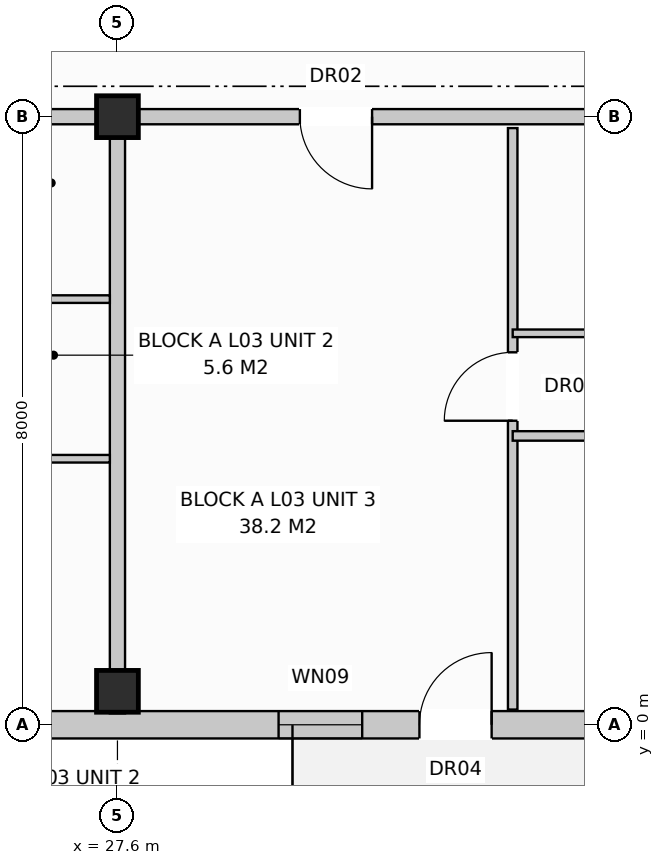
"""IFC4 building model, lengths in metres.
Left out: names, types, materials, properties, quantities, classifications, styles, units other than length and angle.
Written with IfcOpenShell. Run it as: python <this file> out.ifc"""

import sys

from ifc_helpers import new_model, si_unit, direction, frame, frame_2d, origin, origin_with_axes, origin_2d, place, context, subcontext, project, spatial, rectangle, extrude, element, fill, save


model = new_model("IFC4")
c1 = context("Model", 3, precision=1e-05, world=origin(), true_north=direction((0.0, 1.0)))
c2 = subcontext(c1, "Body", "Model", "MODEL_VIEW")
j1 = project(units=[si_unit("LENGTHUNIT", "METRE"), si_unit("PLANEANGLEUNIT", "RADIAN")], contexts=[c1])
p1 = place(None, origin())
s1 = spatial("IfcSite", under=j1, at=p1, CompositionType="ELEMENT")
p2 = place(p1, origin())
s2 = spatial("IfcBuilding", under=s1, at=p2, CompositionType="ELEMENT")
p3 = place(p2, frame((0.0, 0.0, 11.2)))
s3 = spatial("IfcBuildingStorey", under=s2, at=p3, CompositionType="ELEMENT", Elevation=11.2)
for number, where, z_axis, x_axis in (
    (1, (27.6, 0.44, 0.0), (0.0, 0.0, 1.0), (1.0, 0.0, 0.0)),
    (2, (27.6, 8.0, 0.0), (0.0, 0.0, 1.0), (1.0, 0.0, 0.0)),
):
    element("IfcColumn", number, at=place(p3, frame(where, z_axis=z_axis, x_axis=x_axis)), inside=s3, PredefinedType="COLUMN", context=c2, shape_type="SweptSolid", body=[
        extrude(rectangle(XDim=0.55, YDim=0.55, at=origin_2d()), origin(), (0.0, 0.0, 1.0), 3.2),
    ])
p4 = place(p3, frame((0.17, 0.0, 0.0), z_axis=(0.0, 0.0, 1.0), x_axis=(1.0, 0.0, 0.0)))
e3 = element("IfcWall", 3, at=p4, inside=s3, PredefinedType="STANDARD", context=c2, shape_type="SweptSolid", body=[
    extrude(rectangle(XDim=54.86, YDim=0.36, at=frame_2d((27.43, 0.0))), origin(), (0.0, 0.0, 1.0), 2.94),
])
p5 = place(p4, frame((4.903, 0.0, 0.0)))
e4 = element("IfcOpeningElement", 4, at=p5, cuts=e3, PredefinedType="OPENING", context=c2, shape_type="SweptSolid", body=[
    extrude(rectangle(XDim=0.95, YDim=2.1, at=frame_2d((0.475, 1.05))), frame((0.0, 0.192, 0.0), z_axis=(0.0, -1.0, 0.0), x_axis=(1.0, 0.0, 0.0)), (0.0, 0.0, 1.0), 0.384),
])
p6 = place(p4, frame((18.9, 0.0, 0.0)))
e5 = element("IfcOpeningElement", 5, at=p6, cuts=e3, PredefinedType="OPENING", context=c2, shape_type="SweptSolid", body=[
    extrude(rectangle(XDim=0.95, YDim=2.1, at=frame_2d((0.475, 1.05))), frame((0.0, 0.192, 0.0), z_axis=(0.0, -1.0, 0.0), x_axis=(1.0, 0.0, 0.0)), (0.0, 0.0, 1.0), 0.384),
])
p7 = place(p4, frame((31.403, 0.0, 0.0)))
e6 = element("IfcOpeningElement", 6, at=p7, cuts=e3, PredefinedType="OPENING", context=c2, shape_type="SweptSolid", body=[
    extrude(rectangle(XDim=0.95, YDim=2.1, at=frame_2d((0.475, 1.05))), frame((0.0, 0.192, 0.0), z_axis=(0.0, -1.0, 0.0), x_axis=(1.0, 0.0, 0.0)), (0.0, 0.0, 1.0), 0.384),
])
p8 = place(p4, frame((44.308, 0.0, 0.0)))
e7 = element("IfcOpeningElement", 7, at=p8, cuts=e3, PredefinedType="OPENING", context=c2, shape_type="SweptSolid", body=[
    extrude(rectangle(XDim=0.95, YDim=2.1, at=frame_2d((0.475, 1.05))), frame((0.0, 0.192, 0.0), z_axis=(0.0, -1.0, 0.0), x_axis=(1.0, 0.0, 0.0)), (0.0, 0.0, 1.0), 0.384),
])
p9 = place(p4, frame((2.1, 0.0, 0.8)))
e8 = element("IfcOpeningElement", 8, at=p9, cuts=e3, PredefinedType="OPENING", context=c2, shape_type="SweptSolid", body=[
    extrude(rectangle(XDim=1.8, YDim=1.7, at=frame_2d((0.9, 0.85))), frame((0.0, 0.192, 0.0), z_axis=(0.0, -1.0, 0.0), x_axis=(1.0, 0.0, 0.0)), (0.0, 0.0, 1.0), 0.384),
])
p10 = place(p4, frame((7.75, 0.0, 0.72)))
e9 = element("IfcOpeningElement", 9, at=p10, cuts=e3, PredefinedType="OPENING", context=c2, shape_type="SweptSolid", body=[
    extrude(rectangle(XDim=1.9, YDim=1.85, at=frame_2d((0.95, 0.925))), frame((0.0, 0.192, 0.0), z_axis=(0.0, -1.0, 0.0), x_axis=(1.0, 0.0, 0.0)), (0.0, 0.0, 1.0), 0.384),
])
p11 = place(p4, frame((14.55, 0.0, 0.72)))
e10 = element("IfcOpeningElement", 10, at=p11, cuts=e3, PredefinedType="OPENING", context=c2, shape_type="SweptSolid", body=[
    extrude(rectangle(XDim=1.1, YDim=1.5, at=frame_2d((0.55, 0.75))), frame((0.0, 0.192, 0.0), z_axis=(0.0, -1.0, 0.0), x_axis=(1.0, 0.0, 0.0)), (0.0, 0.0, 1.0), 0.384),
])
p12 = place(p4, frame((16.8, 0.0, 0.8)))
e11 = element("IfcOpeningElement", 11, at=p12, cuts=e3, PredefinedType="OPENING", context=c2, shape_type="SweptSolid", body=[
    extrude(rectangle(XDim=1.8, YDim=1.7, at=frame_2d((0.9, 0.85))), frame((0.0, 0.192, 0.0), z_axis=(0.0, -1.0, 0.0), x_axis=(1.0, 0.0, 0.0)), (0.0, 0.0, 1.0), 0.384),
])
p13 = place(p4, frame((21.55, 0.0, 0.72)))
e12 = element("IfcOpeningElement", 12, at=p13, cuts=e3, PredefinedType="OPENING", context=c2, shape_type="SweptSolid", body=[
    extrude(rectangle(XDim=1.9, YDim=1.85, at=frame_2d((0.95, 0.925))), frame((0.0, 0.192, 0.0), z_axis=(0.0, -1.0, 0.0), x_axis=(1.0, 0.0, 0.0)), (0.0, 0.0, 1.0), 0.384),
])
p14 = place(p4, frame((25.35, 0.0, 0.72)))
e13 = element("IfcOpeningElement", 13, at=p14, cuts=e3, PredefinedType="OPENING", context=c2, shape_type="SweptSolid", body=[
    extrude(rectangle(XDim=1.1, YDim=1.5, at=frame_2d((0.55, 0.75))), frame((0.0, 0.192, 0.0), z_axis=(0.0, -1.0, 0.0), x_axis=(1.0, 0.0, 0.0)), (0.0, 0.0, 1.0), 0.384),
])
p15 = place(p4, frame((29.55, 0.0, 0.72)))
e14 = element("IfcOpeningElement", 14, at=p15, cuts=e3, PredefinedType="OPENING", context=c2, shape_type="SweptSolid", body=[
    extrude(rectangle(XDim=1.1, YDim=1.5, at=frame_2d((0.55, 0.75))), frame((0.0, 0.192, 0.0), z_axis=(0.0, -1.0, 0.0), x_axis=(1.0, 0.0, 0.0)), (0.0, 0.0, 1.0), 0.384),
])
p16 = place(p4, frame((34.833, 0.0, 0.72)))
e15 = element("IfcOpeningElement", 15, at=p16, cuts=e3, PredefinedType="OPENING", context=c2, shape_type="SweptSolid", body=[
    extrude(rectangle(XDim=1.9, YDim=1.85, at=frame_2d((0.95, 0.925))), frame((0.0, 0.192, 0.0), z_axis=(0.0, -1.0, 0.0), x_axis=(1.0, 0.0, 0.0)), (0.0, 0.0, 1.0), 0.384),
])
p17 = place(p4, frame((38.45, 0.0, 0.72)))
e16 = element("IfcOpeningElement", 16, at=p17, cuts=e3, PredefinedType="OPENING", context=c2, shape_type="SweptSolid", body=[
    extrude(rectangle(XDim=1.1, YDim=1.5, at=frame_2d((0.55, 0.75))), frame((0.0, 0.192, 0.0), z_axis=(0.0, -1.0, 0.0), x_axis=(1.0, 0.0, 0.0)), (0.0, 0.0, 1.0), 0.384),
])
p18 = place(p4, frame((42.55, 0.0, 0.72)))
e17 = element("IfcOpeningElement", 17, at=p18, cuts=e3, PredefinedType="OPENING", context=c2, shape_type="SweptSolid", body=[
    extrude(rectangle(XDim=1.1, YDim=1.5, at=frame_2d((0.55, 0.75))), frame((0.0, 0.192, 0.0), z_axis=(0.0, -1.0, 0.0), x_axis=(1.0, 0.0, 0.0)), (0.0, 0.0, 1.0), 0.384),
])
p19 = place(p4, frame((45.75, 0.0, 0.72)))
e18 = element("IfcOpeningElement", 18, at=p19, cuts=e3, PredefinedType="OPENING", context=c2, shape_type="SweptSolid", body=[
    extrude(rectangle(XDim=1.9, YDim=1.85, at=frame_2d((0.95, 0.925))), frame((0.0, 0.192, 0.0), z_axis=(0.0, -1.0, 0.0), x_axis=(1.0, 0.0, 0.0)), (0.0, 0.0, 1.0), 0.384),
])
p20 = place(p4, frame((49.125, 0.0, 0.8)))
e19 = element("IfcOpeningElement", 19, at=p20, cuts=e3, PredefinedType="OPENING", context=c2, shape_type="SweptSolid", body=[
    extrude(rectangle(XDim=1.95, YDim=1.65, at=frame_2d((0.975, 0.825))), frame((0.0, 0.192, 0.0), z_axis=(0.0, -1.0, 0.0), x_axis=(1.0, 0.0, 0.0)), (0.0, 0.0, 1.0), 0.384),
])
p21 = place(p4, frame((52.95, 0.0, 0.72)))
e20 = element("IfcOpeningElement", 20, at=p21, cuts=e3, PredefinedType="OPENING", context=c2, shape_type="SweptSolid", body=[
    extrude(rectangle(XDim=1.1, YDim=1.5, at=frame_2d((0.55, 0.75))), frame((0.0, 0.192, 0.0), z_axis=(0.0, -1.0, 0.0), x_axis=(1.0, 0.0, 0.0)), (0.0, 0.0, 1.0), 0.384),
])
p22 = place(p3, frame((27.6, 7.85, 0.0), z_axis=(0.0, 0.0, 1.0), x_axis=(0.0, -1.0, 0.0)))
e21 = element("IfcWall", 21, at=p22, inside=s3, PredefinedType="PARTITIONING", context=c2, shape_type="SweptSolid", body=[
    extrude(rectangle(XDim=7.7, YDim=0.2, at=frame_2d((3.85, 0.0))), origin(), (0.0, 0.0, 1.0), 2.94),
])
p23 = place(p3, frame((20.7, 8.0, 0.0), z_axis=(0.0, 0.0, 1.0), x_axis=(1.0, 0.0, 0.0)))
e22 = element("IfcWall", 22, at=p23, inside=s3, PredefinedType="PARTITIONING", context=c2, shape_type="SweptSolid", body=[
    extrude(rectangle(XDim=6.9, YDim=0.2, at=frame_2d((3.45, 0.0))), origin(), (0.0, 0.0, 1.0), 2.38),
])
p24 = place(p23, frame((2.0, 0.0, 0.0)))
e23 = element("IfcOpeningElement", 23, at=p24, cuts=e22, PredefinedType="OPENING", context=c2, shape_type="SweptSolid", body=[
    extrude(rectangle(XDim=0.95, YDim=2.15, at=frame_2d((0.475, 1.075))), frame((0.0, 0.112, 0.0), z_axis=(0.0, -1.0, 0.0), x_axis=(1.0, 0.0, 0.0)), (0.0, 0.0, 1.0), 0.224),
])
for number, where, z_axis, x_axis in (
    (24, (24.6, 5.6, 0.0), (0.0, 0.0, 1.0), (1.0, 0.0, 0.0)),
    (25, (24.6, 3.5, 0.0), (0.0, 0.0, 1.0), (1.0, 0.0, 0.0)),
):
    element("IfcWall", number, at=place(p3, frame(where, z_axis=z_axis, x_axis=x_axis)), inside=s3, PredefinedType="PARTITIONING", context=c2, shape_type="SweptSolid", body=[
        extrude(rectangle(XDim=2.9, YDim=0.1, at=frame_2d((1.45, 0.0))), origin(), (0.0, 0.0, 1.0), 2.94),
    ])
p25 = place(p3, frame((27.6, 8.0, 0.0), z_axis=(0.0, 0.0, 1.0), x_axis=(1.0, 0.0, 0.0)))
e26 = element("IfcWall", 26, at=p25, inside=s3, PredefinedType="PARTITIONING", context=c2, shape_type="SweptSolid", body=[
    extrude(rectangle(XDim=13.8, YDim=0.2, at=frame_2d((6.9, 0.0))), origin(), (0.0, 0.0, 1.0), 2.38),
])
p26 = place(p25, frame((2.4, 0.0, 0.0)))
e27 = element("IfcOpeningElement", 27, at=p26, cuts=e26, PredefinedType="OPENING", context=c2, shape_type="SweptSolid", body=[
    extrude(rectangle(XDim=0.95, YDim=2.15, at=frame_2d((0.475, 1.075))), frame((0.0, 0.112, 0.0), z_axis=(0.0, -1.0, 0.0), x_axis=(1.0, 0.0, 0.0)), (0.0, 0.0, 1.0), 0.224),
])
p27 = place(p3, frame((32.8, 7.85, 0.0), z_axis=(0.0, 0.0, 1.0), x_axis=(0.0, -1.0, 0.0)))
e28 = element("IfcWall", 28, at=p27, inside=s3, PredefinedType="PARTITIONING", context=c2, shape_type="SweptSolid", body=[
    extrude(rectangle(XDim=7.65, YDim=0.125, at=frame_2d((3.825, 0.0))), origin(), (0.0, 0.0, 1.0), 2.94),
])
p28 = place(p27, frame((2.95, 0.0, 0.0)))
e29 = element("IfcOpeningElement", 29, at=p28, cuts=e28, PredefinedType="OPENING", context=c2, shape_type="SweptSolid", body=[
    extrude(rectangle(XDim=0.9, YDim=2.1, at=frame_2d((0.45, 1.05))), frame((0.0, 0.074, 0.0), z_axis=(0.0, -1.0, 0.0), x_axis=(1.0, 0.0, 0.0)), (0.0, 0.0, 1.0), 0.149),
])
p29 = place(p3, frame((32.8, 5.15, 0.0), z_axis=(0.0, 0.0, 1.0), x_axis=(1.0, 0.0, 0.0)))
e30 = element("IfcWall", 30, at=p29, inside=s3, PredefinedType="PARTITIONING", context=c2, shape_type="SweptSolid", body=[
    extrude(rectangle(XDim=8.5, YDim=0.1, at=frame_2d((4.25, 0.0))), origin(), (0.0, 0.0, 1.0), 2.94),
])
p30 = place(p29, frame((1.0, 0.0, 0.0)))
e31 = element("IfcOpeningElement", 31, at=p30, cuts=e30, PredefinedType="OPENING", context=c2, shape_type="SweptSolid", body=[
    extrude(rectangle(XDim=0.85, YDim=2.1, at=frame_2d((0.425, 1.05))), frame((0.0, 0.062, 0.0), z_axis=(0.0, -1.0, 0.0), x_axis=(1.0, 0.0, 0.0)), (0.0, 0.0, 1.0), 0.124),
])
p31 = place(p29, frame((3.4, 0.0, 0.0)))
e32 = element("IfcOpeningElement", 32, at=p31, cuts=e30, PredefinedType="OPENING", context=c2, shape_type="SweptSolid", body=[
    extrude(rectangle(XDim=0.85, YDim=2.05, at=frame_2d((0.425, 1.025))), frame((0.0, 0.062, 0.0), z_axis=(0.0, -1.0, 0.0), x_axis=(1.0, 0.0, 0.0)), (0.0, 0.0, 1.0), 0.124),
])
p32 = place(p29, frame((6.2, 0.0, 0.0)))
e33 = element("IfcOpeningElement", 33, at=p32, cuts=e30, PredefinedType="OPENING", context=c2, shape_type="SweptSolid", body=[
    extrude(rectangle(XDim=0.85, YDim=2.05, at=frame_2d((0.425, 1.025))), frame((0.0, 0.062, 0.0), z_axis=(0.0, -1.0, 0.0), x_axis=(1.0, 0.0, 0.0)), (0.0, 0.0, 1.0), 0.124),
])
p33 = place(p3, frame((32.8, 3.8, 0.0), z_axis=(0.0, 0.0, 1.0), x_axis=(1.0, 0.0, 0.0)))
e34 = element("IfcWall", 34, at=p33, inside=s3, PredefinedType="PARTITIONING", context=c2, shape_type="SweptSolid", body=[
    extrude(rectangle(XDim=8.5, YDim=0.125, at=frame_2d((4.25, 0.0))), origin(), (0.0, 0.0, 1.0), 2.94),
])
p34 = place(p33, frame((1.5, 0.0, 0.0)))
e35 = element("IfcOpeningElement", 35, at=p34, cuts=e34, PredefinedType="OPENING", context=c2, shape_type="SweptSolid", body=[
    extrude(rectangle(XDim=0.9, YDim=2.1, at=frame_2d((0.45, 1.05))), frame((0.0, 0.074, 0.0), z_axis=(0.0, -1.0, 0.0), x_axis=(1.0, 0.0, 0.0)), (0.0, 0.0, 1.0), 0.149),
])
p35 = place(p33, frame((5.6, 0.0, 0.0)))
e36 = element("IfcOpeningElement", 36, at=p35, cuts=e34, PredefinedType="OPENING", context=c2, shape_type="SweptSolid", body=[
    extrude(rectangle(XDim=0.9, YDim=2.1, at=frame_2d((0.45, 1.05))), frame((0.0, 0.074, 0.0), z_axis=(0.0, -1.0, 0.0), x_axis=(1.0, 0.0, 0.0)), (0.0, 0.0, 1.0), 0.149),
])
p36 = place(p7, origin_with_axes())
e37 = element("IfcDoor", 37, at=p36, inside=s3, OperationType="SINGLE_SWING_RIGHT", PredefinedType="DOOR", context=c2, shape_type="SweptSolid", body=[
    extrude(rectangle(XDim=0.95, YDim=2.1, at=frame_2d((0.475, 1.05))), frame((0.0, 0.025, 0.0), z_axis=(0.0, -1.0, 0.0), x_axis=(1.0, 0.0, 0.0)), (0.0, 0.0, 1.0), 0.05),
])
fill(e6, e37)
p37 = place(p15, origin_with_axes())
e38 = element("IfcWindow", 38, at=p37, inside=s3, PartitioningType="SINGLE_PANEL", PredefinedType="WINDOW", context=c2, shape_type="SweptSolid", body=[
    extrude(rectangle(XDim=1.1, YDim=1.5, at=frame_2d((0.55, 0.75))), frame((0.0, 0.03, 0.0), z_axis=(0.0, -1.0, 0.0), x_axis=(1.0, 0.0, 0.0)), (0.0, 0.0, 1.0), 0.06),
])
fill(e14, e38)
p38 = place(p26, frame((0.95, 0.0, 0.0), z_axis=(0.0, 0.0, 1.0), x_axis=(-1.0, 0.0, 0.0)))
e39 = element("IfcDoor", 39, at=p38, inside=s3, OperationType="SINGLE_SWING_RIGHT", PredefinedType="DOOR", context=c2, shape_type="SweptSolid", body=[
    extrude(rectangle(XDim=0.95, YDim=2.15, at=frame_2d((0.475, 1.075))), frame((0.0, 0.025, 0.0), z_axis=(0.0, -1.0, 0.0), x_axis=(1.0, 0.0, 0.0)), (0.0, 0.0, 1.0), 0.05),
])
fill(e27, e39)
p39 = place(p28, frame((0.9, 0.0, 0.0), z_axis=(0.0, 0.0, 1.0), x_axis=(-1.0, 0.0, 0.0)))
e40 = element("IfcDoor", 40, at=p39, inside=s3, OperationType="SINGLE_SWING_RIGHT", PredefinedType="DOOR", context=c2, shape_type="SweptSolid", body=[
    extrude(rectangle(XDim=0.9, YDim=2.1, at=frame_2d((0.45, 1.05))), frame((0.0, 0.025, 0.0), z_axis=(0.0, -1.0, 0.0), x_axis=(1.0, 0.0, 0.0)), (0.0, 0.0, 1.0), 0.05),
])
fill(e29, e40)
save(model, sys.argv[1])
